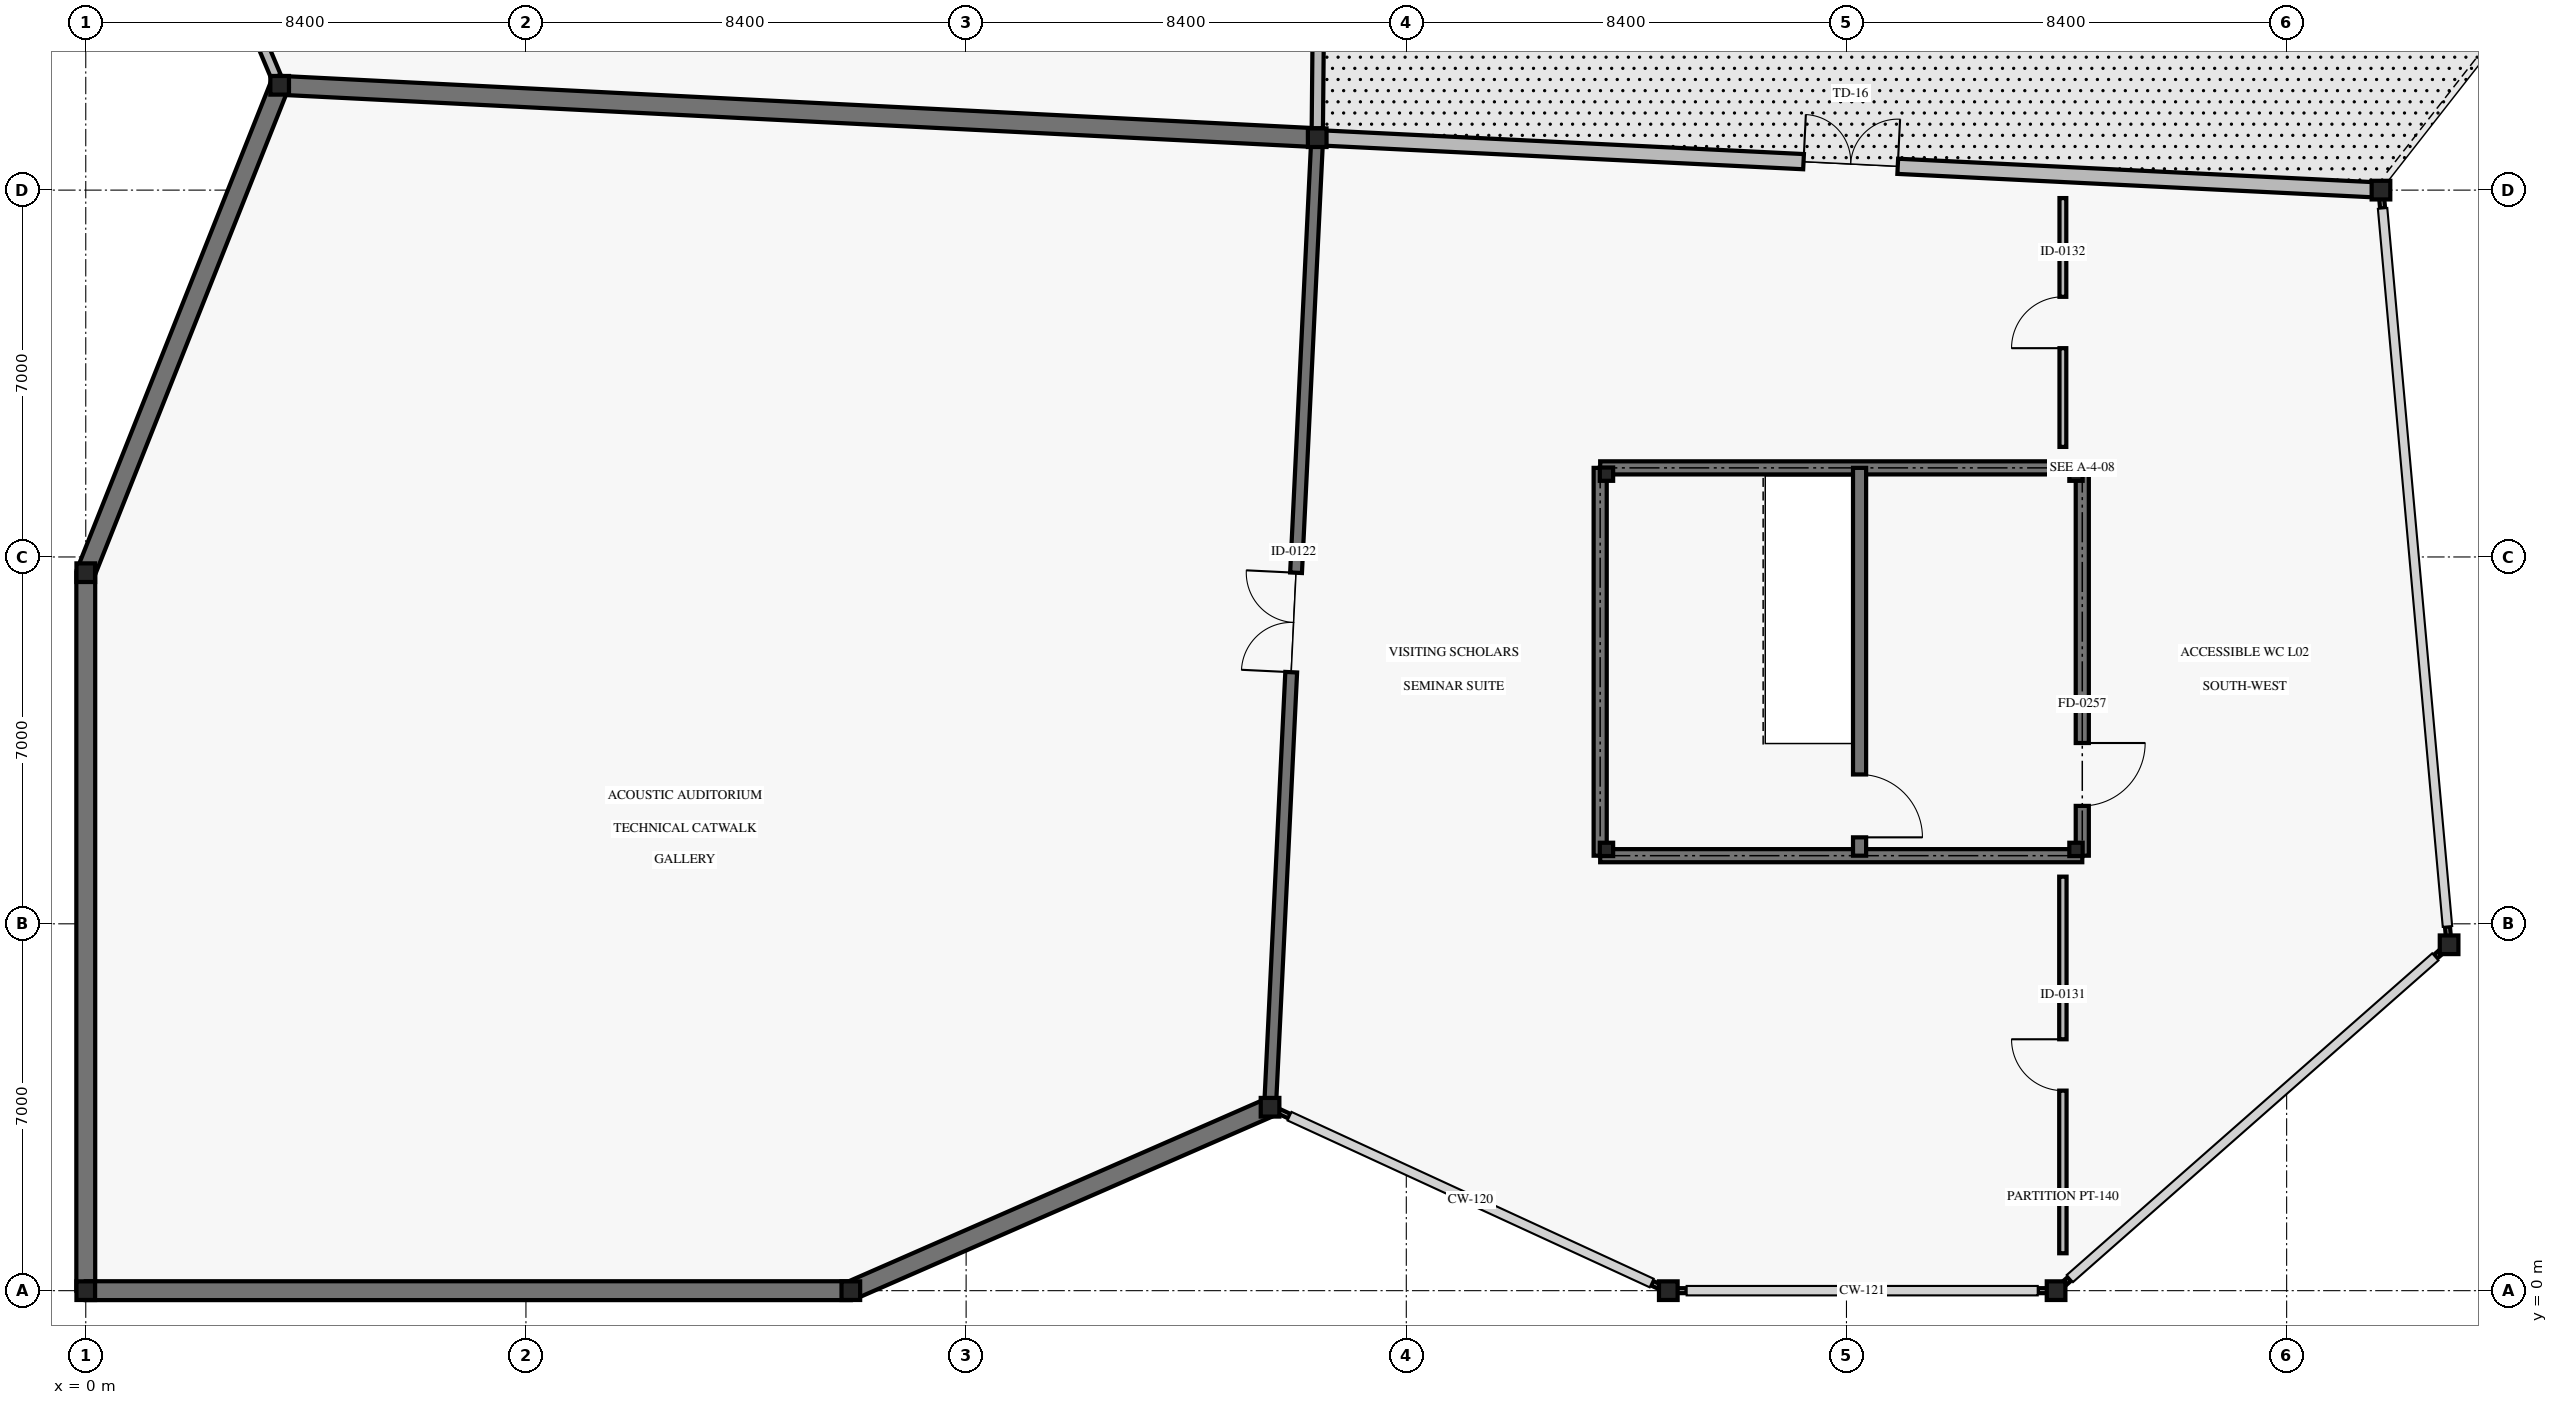
"""IFC4 building model, lengths in metres.
Left out: names, types, materials, properties, quantities, classifications, styles, units other than length and angle.
Written with IfcOpenShell. Run it as: python <this file> out.ifc"""

import sys

from ifc_helpers import new_model, si_unit, direction, frame, frame_2d, origin, origin_2d, place, context, subcontext, project, spatial, rectangle, hollow_circle, i_section, extrude, element, fill, save


model = new_model("IFC4")
c1 = context("Model", 3, precision=1e-05, world=origin(), true_north=direction((0.0, 1.0)))
c2 = subcontext(c1, "Body", "Model", "MODEL_VIEW")
j1 = project(units=[si_unit("LENGTHUNIT", "METRE"), si_unit("PLANEANGLEUNIT", "RADIAN")], contexts=[c1])
p1 = place(None, origin())
s1 = spatial("IfcSite", under=j1, at=p1, CompositionType="ELEMENT")
p2 = place(p1, origin())
s2 = spatial("IfcBuilding", under=s1, at=p2, CompositionType="ELEMENT")
p3 = place(p2, frame((0.0, 0.0, 10.2)))
s3 = spatial("IfcBuildingStorey", under=s2, at=p3, CompositionType="ELEMENT", Elevation=10.2)
for number, where, z_axis, x_axis in (
    (1, (0.0, 0.0, 0.0), (0.0, 0.0, 1.0), (1.0, 0.0, 0.0)),
    (2, (0.0, 13.7, 0.0), (0.0, 0.0, 1.0), (1.0, 0.0, 0.0)),
    (3, (3.7, 23.0, 0.0), (0.0, 0.0, 1.0), (1.0, 0.0, 0.0)),
    (4, (14.6, 0.0, 0.0), (0.0, 0.0, 1.0), (1.0, 0.0, 0.0)),
    (5, (22.6, 3.5, 0.0), (0.0, 0.0, 1.0), (1.0, 0.0, 0.0)),
    (6, (23.5, 22.0, 0.0), (0.0, 0.0, 1.0), (1.0, 0.0, 0.0)),
    (7, (30.2, 0.0, 0.0), (0.0, 0.0, 1.0), (1.0, 0.0, 0.0)),
    (8, (37.6, 0.0, 0.0), (0.0, 0.0, 1.0), (1.0, 0.0, 0.0)),
    (9, (43.8, 21.0, 0.0), (0.0, 0.0, 1.0), (1.0, 0.0, 0.0)),
    (10, (45.1, 6.6, 0.0), (0.0, 0.0, 1.0), (1.0, 0.0, 0.0)),
):
    element("IfcColumn", number, at=place(p3, frame(where, z_axis=z_axis, x_axis=x_axis)), inside=s3, PredefinedType="COLUMN", context=c2, shape_type="SweptSolid", body=[
        extrude(hollow_circle(Radius=0.178, WallThickness=0.013, at=origin_2d()), origin(), (0.0, 0.0, 1.0), 4.8),
    ])
for number, where, z_axis, x_axis in (
    (11, (29.02, 8.42, 0.0), (0.0, 0.0, 1.0), (1.0, 0.0, 0.0)),
    (12, (37.98, 8.42, 0.0), (0.0, 0.0, 1.0), (1.0, 0.0, 0.0)),
    (13, (37.98, 15.58, 0.0), (0.0, 0.0, 1.0), (1.0, 0.0, 0.0)),
    (14, (29.02, 15.58, 0.0), (0.0, 0.0, 1.0), (1.0, 0.0, 0.0)),
):
    element("IfcColumn", number, at=place(p3, frame(where, z_axis=z_axis, x_axis=x_axis)), inside=s3, PredefinedType="COLUMN", context=c2, shape_type="SweptSolid", body=[
        extrude(i_section(OverallWidth=0.254, OverallDepth=0.254, WebThickness=0.009, FlangeThickness=0.014, FilletRadius=0.013, at=origin_2d()), origin(), (0.0, 0.0, 1.0), 4.8),
    ])
p4 = place(p3, frame((3.7, 23.0, 0.0), z_axis=(0.0, 0.0, 1.0), x_axis=(0.998726796939, -0.050445862825, 0.0)))
e15 = element("IfcWall", 15, at=p4, inside=s3, PredefinedType="SOLIDWALL", context=c2, shape_type="SweptSolid", body=[
    extrude(rectangle(XDim=19.765, YDim=0.36, at=frame_2d((9.883, 0.0))), origin(), (0.0, 0.0, 1.0), 3.62),
])
p5 = place(p3, frame((0.0, 13.7, 0.0), z_axis=(0.0, 0.0, 1.0), x_axis=(0.369661561468, 0.929166470538, 0.0)))
e16 = element("IfcWall", 16, at=p5, inside=s3, PredefinedType="SOLIDWALL", context=c2, shape_type="SweptSolid", body=[
    extrude(rectangle(XDim=10.009, YDim=0.36, at=frame_2d((5.004, 0.0))), origin(), (0.0, 0.0, 1.0), 3.62),
])
p6 = place(p3, frame((0.0, 0.0, 0.0), z_axis=(0.0, 0.0, 1.0), x_axis=(0.0, 1.0, 0.0)))
e17 = element("IfcWall", 17, at=p6, inside=s3, PredefinedType="SOLIDWALL", context=c2, shape_type="SweptSolid", body=[
    extrude(rectangle(XDim=13.7, YDim=0.36, at=frame_2d((6.85, 0.0))), origin(), (0.0, 0.0, 1.0), 3.62),
])
p7 = place(p3, frame((14.6, 0.0, 0.0), z_axis=(0.0, 0.0, 1.0), x_axis=(-1.0, 0.0, 0.0)))
e18 = element("IfcWall", 18, at=p7, inside=s3, PredefinedType="SOLIDWALL", context=c2, shape_type="SweptSolid", body=[
    extrude(rectangle(XDim=14.6, YDim=0.36, at=frame_2d((7.3, 0.0))), origin(), (0.0, 0.0, 1.0), 3.62),
])
p8 = place(p3, frame((22.545, 3.476, 0.0), z_axis=(0.0, 0.0, 1.0), x_axis=(-0.916148288852, -0.400839510069, 0.0)))
e19 = element("IfcWall", 19, at=p8, inside=s3, PredefinedType="SOLIDWALL", context=c2, shape_type="SweptSolid", body=[
    extrude(rectangle(XDim=8.672, YDim=0.36, at=frame_2d((4.336, 0.0))), origin(), (0.0, 0.0, 1.0), 3.62),
])
for number, where, z_axis, x_axis in (
    (20, (30.162, 0.018, 0.0), (0.0, 0.0, 1.0), (-0.91, 0.416, 0.0)),
    (21, (22.972, 3.329, 0.0), (0.0, 0.0, 1.0), (-0.91, 0.416, 0.0)),
):
    element("IfcWall", number, at=place(p3, frame(where, z_axis=z_axis, x_axis=x_axis)), inside=s3, PredefinedType="SOLIDWALL", context=c2, shape_type="SweptSolid", body=[
        extrude(rectangle(XDim=0.308, YDim=0.095, at=frame_2d((0.154, 0.0))), origin(), (0.0, 0.0, 1.0), 3.62),
    ])
for number, where, z_axis, x_axis in (
    (22, (37.558, 0.0, 0.0), (0.0, 0.0, 1.0), (-1.0, 0.0, 0.0)),
    (23, (30.55, 0.0, 0.0), (0.0, 0.0, 1.0), (-1.0, 0.0, 0.0)),
):
    element("IfcWall", number, at=place(p3, frame(where, z_axis=z_axis, x_axis=x_axis)), inside=s3, PredefinedType="SOLIDWALL", context=c2, shape_type="SweptSolid", body=[
        extrude(rectangle(XDim=0.308, YDim=0.095, at=frame_2d((0.154, 0.0))), origin(), (0.0, 0.0, 1.0), 3.62),
    ])
p9 = place(p3, frame((45.068, 6.572, 0.0), z_axis=(0.0, 0.0, 1.0), x_axis=(-0.75124833206, -0.660019653932, 0.0)))
e24 = element("IfcWall", 24, at=p9, inside=s3, PredefinedType="SOLIDWALL", context=c2, shape_type="SweptSolid", body=[
    extrude(rectangle(XDim=0.308, YDim=0.095, at=frame_2d((0.154, 0.0))), origin(), (0.0, 0.0, 1.0), 3.62),
])
p10 = place(p3, frame((37.863, 0.231, 0.0), z_axis=(0.0, 0.0, 1.0), x_axis=(-0.751296149946, -0.659965222627, 0.0)))
e25 = element("IfcWall", 25, at=p10, inside=s3, PredefinedType="SOLIDWALL", context=c2, shape_type="SweptSolid", body=[
    extrude(rectangle(XDim=0.307, YDim=0.095, at=frame_2d((0.154, 0.0))), origin(), (0.0, 0.0, 1.0), 3.62),
])
p11 = place(p3, frame((43.804, 20.958, 0.0), z_axis=(0.0, 0.0, 1.0), x_axis=(0.087893810296, -0.996129850025, 0.0)))
e26 = element("IfcWall", 26, at=p11, inside=s3, PredefinedType="SOLIDWALL", context=c2, shape_type="SweptSolid", body=[
    extrude(rectangle(XDim=0.308, YDim=0.095, at=frame_2d((0.154, 0.0))), origin(), (0.0, 0.0, 1.0), 3.62),
])
p12 = place(p3, frame((45.069, 6.949, 0.0), z_axis=(0.0, 0.0, 1.0), x_axis=(0.087176781459, -0.996192857219, 0.0)))
e27 = element("IfcWall", 27, at=p12, inside=s3, PredefinedType="SOLIDWALL", context=c2, shape_type="SweptSolid", body=[
    extrude(rectangle(XDim=0.308, YDim=0.095, at=frame_2d((0.154, 0.0))), origin(), (0.0, 0.0, 1.0), 3.62),
])
p13 = place(p3, frame((23.56, 21.997, 0.0), z_axis=(0.0, 0.0, 1.0), x_axis=(0.998788812439, -0.049202724992, 0.0)))
e28 = element("IfcWall", 28, at=p13, inside=s3, PredefinedType="SOLIDWALL", context=c2, shape_type="SweptSolid", body=[
    extrude(rectangle(XDim=20.265, YDim=0.29, at=frame_2d((10.132, 0.0))), origin(), (0.0, 0.0, 1.0), 3.62),
])
p14 = place(p13, frame((9.232, 0.0, 0.0)))
e29 = element("IfcOpeningElement", 29, at=p14, cuts=e28, PredefinedType="OPENING", context=c2, shape_type="SweptSolid", body=[
    extrude(rectangle(XDim=1.8, YDim=2.25, at=frame_2d((0.9, 1.125))), frame((0.0, 0.155, 0.0), z_axis=(0.0, -1.0, 0.0), x_axis=(1.0, 0.0, 0.0)), (0.0, 0.0, 1.0), 0.31),
])
p15 = place(p3, frame((0.0, 31.8, 0.0), z_axis=(0.0, 0.0, 1.0), x_axis=(0.387558181878, -0.921845244962, 0.0)))
e30 = element("IfcWall", 30, at=p15, inside=s3, PredefinedType="PARAPET", context=c2, shape_type="SweptSolid", body=[
    extrude(rectangle(XDim=9.366, YDim=0.195, at=frame_2d((4.683, 0.0))), origin(), (0.0, 0.0, 1.0), 0.95),
])
p16 = place(p3, frame((23.502, 22.18, 0.0), z_axis=(0.0, 0.0, 1.0), x_axis=(0.009509531412, 0.999954783384, 0.0)))
e31 = element("IfcWall", 31, at=p16, inside=s3, PredefinedType="PARAPET", context=c2, shape_type="SweptSolid", body=[
    extrude(rectangle(XDim=20.821, YDim=0.215, at=frame_2d((10.411, 0.0))), origin(), (0.0, 0.0, 1.0), 0.95),
])
p17 = place(p3, frame((22.6, 3.5, 0.0), z_axis=(0.0, 0.0, 1.0), x_axis=(0.048585922438, 0.998819006698, 0.0)))
e32 = element("IfcWall", 32, at=p17, inside=s3, PredefinedType="SOLIDWALL", context=c2, shape_type="SweptSolid", body=[
    extrude(rectangle(XDim=18.522, YDim=0.225, at=frame_2d((9.261, 0.0))), origin(), (0.0, 0.0, 1.0), 4.02),
])
p18 = place(p17, frame((8.311, 0.0, 0.0)))
e33 = element("IfcOpeningElement", 33, at=p18, cuts=e32, PredefinedType="OPENING", context=c2, shape_type="SweptSolid", body=[
    extrude(rectangle(XDim=1.9, YDim=2.35, at=frame_2d((0.95, 1.175))), frame((0.0, 0.123, 0.0), z_axis=(0.0, -1.0, 0.0), x_axis=(1.0, 0.0, 0.0)), (0.0, 0.0, 1.0), 0.245),
])
p19 = place(p3, frame((37.73, 0.714, 0.0), z_axis=(0.0, 0.0, 1.0), x_axis=(0.0, 1.0, 0.0)))
e34 = element("IfcWall", 34, at=p19, inside=s3, PredefinedType="PARTITIONING", context=c2, shape_type="SweptSolid", body=[
    extrude(rectangle(XDim=7.186, YDim=0.14, at=frame_2d((3.593, 0.0))), origin(), (0.0, 0.0, 1.0), 3.32),
])
p20 = place(p19, frame((3.103, 0.0, 0.0)))
e35 = element("IfcOpeningElement", 35, at=p20, cuts=e34, PredefinedType="OPENING", context=c2, shape_type="SweptSolid", body=[
    extrude(rectangle(XDim=0.98, YDim=2.15, at=frame_2d((0.49, 1.075))), frame((0.0, 0.08, 0.0), z_axis=(0.0, -1.0, 0.0), x_axis=(1.0, 0.0, 0.0)), (0.0, 0.0, 1.0), 0.16),
])
p21 = place(p3, frame((37.73, 16.1, 0.0), z_axis=(0.0, 0.0, 1.0), x_axis=(0.0, 1.0, 0.0)))
e36 = element("IfcWall", 36, at=p21, inside=s3, PredefinedType="PARTITIONING", context=c2, shape_type="SweptSolid", body=[
    extrude(rectangle(XDim=4.748, YDim=0.13, at=frame_2d((2.374, 0.0))), origin(), (0.0, 0.0, 1.0), 3.32),
])
p22 = place(p21, frame((1.884, 0.0, 0.0)))
e37 = element("IfcOpeningElement", 37, at=p22, cuts=e36, PredefinedType="OPENING", context=c2, shape_type="SweptSolid", body=[
    extrude(rectangle(XDim=0.98, YDim=2.15, at=frame_2d((0.49, 1.075))), frame((0.0, 0.075, 0.0), z_axis=(0.0, -1.0, 0.0), x_axis=(1.0, 0.0, 0.0)), (0.0, 0.0, 1.0), 0.15),
])
p23 = place(p3, frame((28.9, 8.3, 0.0), z_axis=(0.0, 0.0, 1.0), x_axis=(0.0, 1.0, 0.0)))
e38 = element("IfcWall", 38, at=p23, inside=s3, PredefinedType="SHEAR", context=c2, shape_type="SweptSolid", body=[
    extrude(rectangle(XDim=7.4, YDim=0.25, at=frame_2d((3.7, 0.0))), origin(), (0.0, 0.0, 1.0), 4.56),
])
for number, where, z_axis, x_axis in (
    (39, (28.9, 15.7, 0.0), (0.0, 0.0, 1.0), (1.0, 0.0, 0.0)),
    (40, (38.1, 8.3, 0.0), (0.0, 0.0, 1.0), (-1.0, 0.0, 0.0)),
):
    element("IfcWall", number, at=place(p3, frame(where, z_axis=z_axis, x_axis=x_axis)), inside=s3, PredefinedType="SHEAR", context=c2, shape_type="SweptSolid", body=[
        extrude(rectangle(XDim=9.2, YDim=0.25, at=frame_2d((4.6, 0.0))), origin(), (0.0, 0.0, 1.0), 4.56),
    ])
p24 = place(p3, frame((38.1, 15.7, 0.0), z_axis=(0.0, 0.0, 1.0), x_axis=(0.0, -1.0, 0.0)))
e41 = element("IfcWall", 41, at=p24, inside=s3, PredefinedType="SHEAR", context=c2, shape_type="SweptSolid", body=[
    extrude(rectangle(XDim=7.4, YDim=0.25, at=frame_2d((3.7, 0.0))), origin(), (0.0, 0.0, 1.0), 4.56),
])
p25 = place(p24, frame((5.25, 0.0, 0.0)))
e42 = element("IfcOpeningElement", 42, at=p25, cuts=e41, PredefinedType="OPENING", context=c2, shape_type="SweptSolid", body=[
    extrude(rectangle(XDim=1.2, YDim=2.2, at=frame_2d((0.6, 1.1))), frame((0.0, 0.135, 0.0), z_axis=(0.0, -1.0, 0.0), x_axis=(1.0, 0.0, 0.0)), (0.0, 0.0, 1.0), 0.27),
])
p26 = place(p3, frame((33.85, 15.7, 0.0), z_axis=(0.0, 0.0, 1.0), x_axis=(0.0, -1.0, 0.0)))
e43 = element("IfcWall", 43, at=p26, inside=s3, PredefinedType="SHEAR", context=c2, shape_type="SweptSolid", body=[
    extrude(rectangle(XDim=7.4, YDim=0.25, at=frame_2d((3.7, 0.0))), origin(), (0.0, 0.0, 1.0), 4.56),
])
p27 = place(p26, frame((5.85, 0.0, 0.0)))
e44 = element("IfcOpeningElement", 44, at=p27, cuts=e43, PredefinedType="OPENING", context=c2, shape_type="SweptSolid", body=[
    extrude(rectangle(XDim=1.2, YDim=2.2, at=frame_2d((0.6, 1.1))), frame((0.0, 0.135, 0.0), z_axis=(0.0, -1.0, 0.0), x_axis=(1.0, 0.0, 0.0)), (0.0, 0.0, 1.0), 0.27),
])
p28 = place(p14, origin())
e45 = element("IfcDoor", 45, at=p28, inside=s3, OperationType="DOUBLE_DOOR_SINGLE_SWING", PredefinedType="DOOR", context=c2, shape_type="SweptSolid", body=[
    extrude(rectangle(XDim=1.8, YDim=2.25, at=frame_2d((0.9, 1.125))), frame((0.0, 0.025, 0.0), z_axis=(0.0, -1.0, 0.0), x_axis=(1.0, 0.0, 0.0)), (0.0, 0.0, 1.0), 0.05),
])
fill(e29, e45)
p29 = place(p18, origin())
e46 = element("IfcDoor", 46, at=p29, inside=s3, OperationType="DOUBLE_DOOR_SINGLE_SWING", PredefinedType="DOOR", context=c2, shape_type="SweptSolid", body=[
    extrude(rectangle(XDim=1.9, YDim=2.35, at=frame_2d((0.95, 1.175))), frame((0.0, 0.025, 0.0), z_axis=(0.0, -1.0, 0.0), x_axis=(1.0, 0.0, 0.0)), (0.0, 0.0, 1.0), 0.05),
])
fill(e33, e46)
p30 = place(p20, origin())
e47 = element("IfcDoor", 47, at=p30, inside=s3, OperationType="SINGLE_SWING_RIGHT", PredefinedType="DOOR", context=c2, shape_type="SweptSolid", body=[
    extrude(rectangle(XDim=0.98, YDim=2.15, at=frame_2d((0.49, 1.075))), frame((0.0, 0.025, 0.0), z_axis=(0.0, -1.0, 0.0), x_axis=(1.0, 0.0, 0.0)), (0.0, 0.0, 1.0), 0.05),
])
fill(e35, e47)
p31 = place(p22, origin())
e48 = element("IfcDoor", 48, at=p31, inside=s3, OperationType="SINGLE_SWING_LEFT", PredefinedType="DOOR", context=c2, shape_type="SweptSolid", body=[
    extrude(rectangle(XDim=0.98, YDim=2.15, at=frame_2d((0.49, 1.075))), frame((0.0, 0.025, 0.0), z_axis=(0.0, -1.0, 0.0), x_axis=(1.0, 0.0, 0.0)), (0.0, 0.0, 1.0), 0.05),
])
fill(e37, e48)
p32 = place(p25, origin())
e49 = element("IfcDoor", 49, at=p32, inside=s3, OperationType="SINGLE_SWING_LEFT", PredefinedType="DOOR", context=c2, shape_type="SweptSolid", body=[
    extrude(rectangle(XDim=1.2, YDim=2.2, at=frame_2d((0.6, 1.1))), frame((0.0, 0.025, 0.0), z_axis=(0.0, -1.0, 0.0), x_axis=(1.0, 0.0, 0.0)), (0.0, 0.0, 1.0), 0.05),
])
fill(e42, e49)
p33 = place(p27, origin())
e50 = element("IfcDoor", 50, at=p33, inside=s3, OperationType="SINGLE_SWING_RIGHT", PredefinedType="DOOR", context=c2, shape_type="SweptSolid", body=[
    extrude(rectangle(XDim=1.2, YDim=2.2, at=frame_2d((0.6, 1.1))), frame((0.0, 0.025, 0.0), z_axis=(0.0, -1.0, 0.0), x_axis=(1.0, 0.0, 0.0)), (0.0, 0.0, 1.0), 0.05),
])
fill(e44, e50)
save(model, sys.argv[1])
